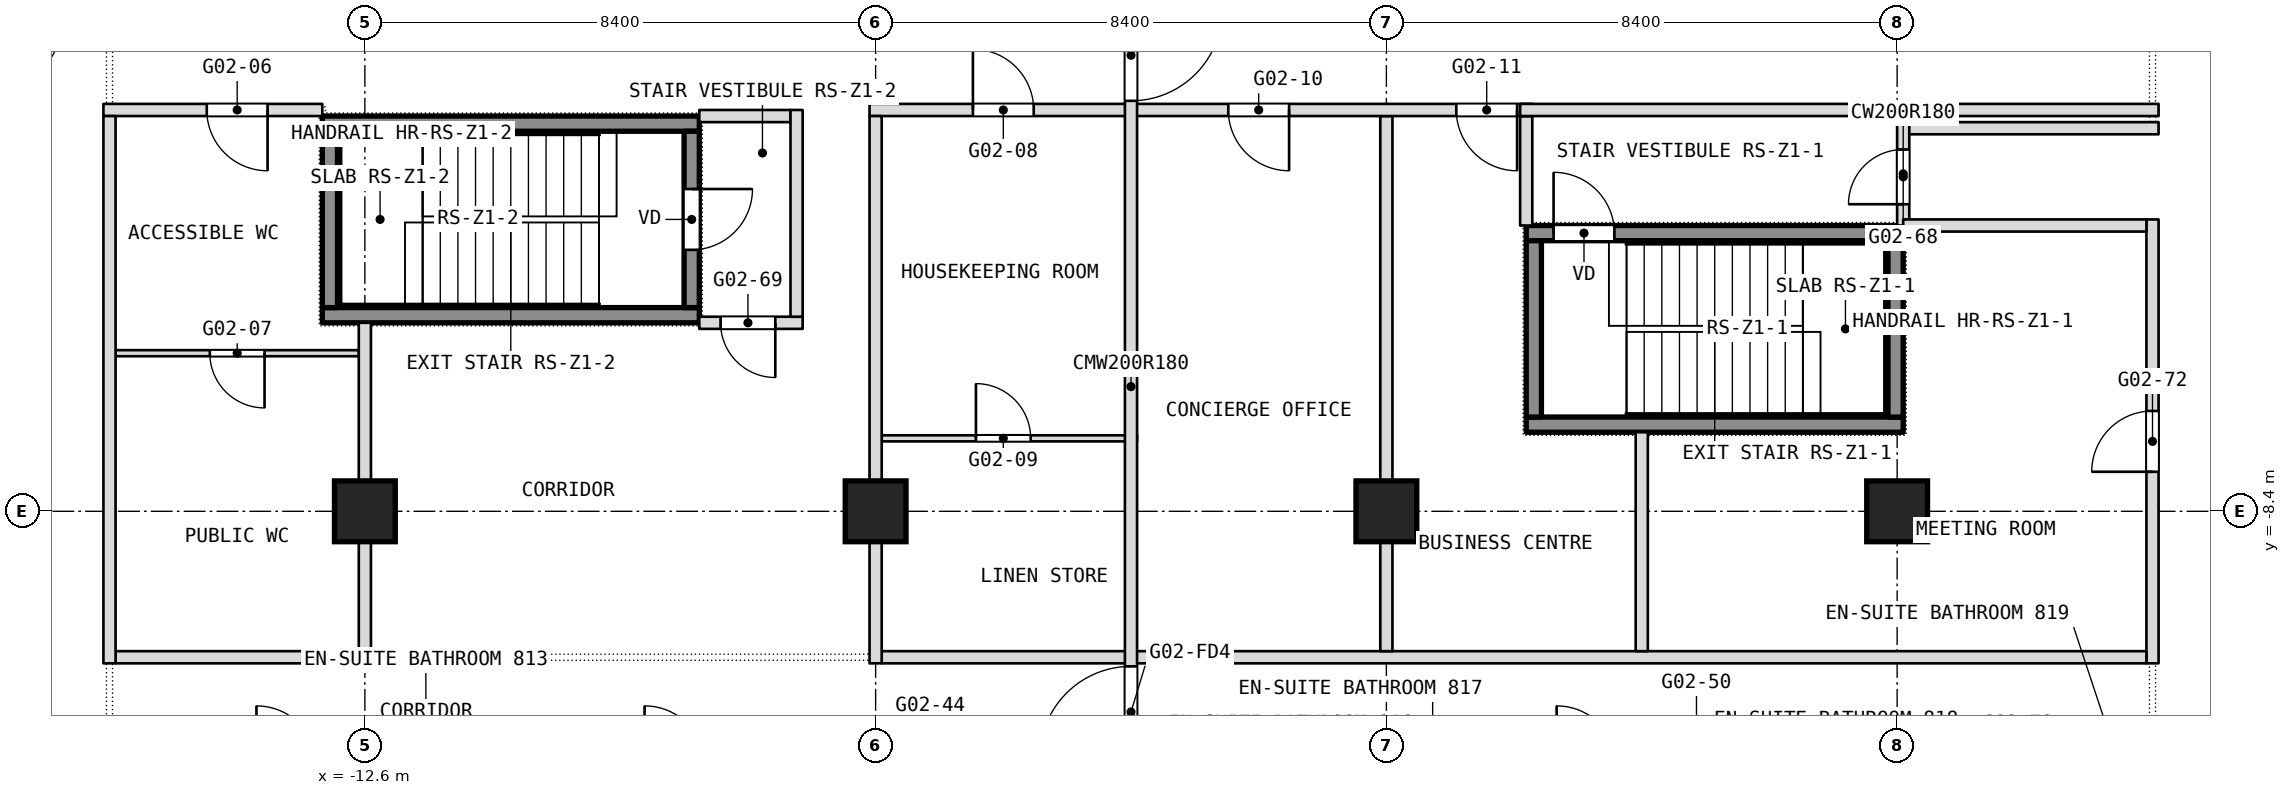
"""IFC4 building model, lengths in metres.
Left out: names, types, materials, properties, quantities, classifications, styles, units other than length and angle.
Written with IfcOpenShell. Run it as: python <this file> out.ifc"""

import sys

from ifc_helpers import new_model, si_unit, direction, frame, frame_2d, origin, origin_2d, place, context, subcontext, project, spatial, rectangle, extrude, element, fill, save


model = new_model("IFC4")
c1 = context("Model", 3, precision=1e-05, world=origin(), true_north=direction((0.0, 1.0)))
c2 = subcontext(c1, "Body", "Model", "MODEL_VIEW")
j1 = project(units=[si_unit("LENGTHUNIT", "METRE"), si_unit("PLANEANGLEUNIT", "RADIAN")], contexts=[c1])
p1 = place(None, origin())
s1 = spatial("IfcSite", under=j1, at=p1, CompositionType="ELEMENT")
p2 = place(p1, origin())
s2 = spatial("IfcBuilding", under=s1, at=p2, CompositionType="ELEMENT")
p3 = place(p2, frame((0.0, 0.0, 43.7)))
s3 = spatial("IfcBuildingStorey", under=s2, at=p3, CompositionType="ELEMENT", Elevation=43.7)
for number, where, z_axis, x_axis in (
    (1, (-12.6, -8.4, 0.0), (0.0, 0.0, 1.0), (1.0, 0.0, 0.0)),
    (2, (-4.2, -8.4, 0.0), (0.0, 0.0, 1.0), (1.0, 0.0, 0.0)),
    (3, (4.2, -8.4, 0.0), (0.0, 0.0, 1.0), (1.0, 0.0, 0.0)),
    (4, (12.6, -8.4, 0.0), (0.0, 0.0, 1.0), (1.0, 0.0, 0.0)),
):
    element("IfcColumn", number, at=place(p3, frame(where, z_axis=z_axis, x_axis=x_axis)), inside=s3, PredefinedType="COLUMN", context=c2, shape_type="SweptSolid", body=[
        extrude(rectangle(XDim=1.0, YDim=1.0, at=origin_2d()), origin(), (0.0, 0.0, 1.0), 3.6),
    ])
p4 = place(p3, frame((16.8, -10.9, 0.0), z_axis=(0.0, 0.0, 1.0), x_axis=(0.0, 1.0, 0.0)))
e5 = element("IfcWall", 5, at=p4, inside=s3, PredefinedType="PARTITIONING", context=c2, shape_type="SweptSolid", body=[
    extrude(rectangle(XDim=7.3, YDim=0.2, at=frame_2d((3.65, 0.0))), origin(), (0.0, 0.0, 1.0), 3.34),
])
p5 = place(p4, frame((3.15, 0.0, 0.0)))
e6 = element("IfcOpeningElement", 6, at=p5, cuts=e5, PredefinedType="OPENING", context=c2, shape_type="SweptSolid", body=[
    extrude(rectangle(XDim=1.0, YDim=2.1, at=frame_2d((0.5, 1.05))), frame((0.0, 0.1, 0.0), z_axis=(0.0, -1.0, 0.0), x_axis=(1.0, 0.0, 0.0)), (0.0, 0.0, 1.0), 0.2),
])
p6 = place(p3, frame((12.7, -3.7, 0.0), z_axis=(0.0, 0.0, 1.0), x_axis=(0.0, 1.0, 0.0)))
e7 = element("IfcWall", 7, at=p6, inside=s3, PredefinedType="PARTITIONING", context=c2, shape_type="SweptSolid", body=[
    extrude(rectangle(XDim=1.7, YDim=0.2, at=frame_2d((0.85, 0.0))), origin(), (0.0, 0.0, 1.0), 3.34),
])
p7 = place(p6, frame((0.35, 0.0, 0.0)))
e8 = element("IfcOpeningElement", 8, at=p7, cuts=e7, PredefinedType="OPENING", context=c2, shape_type="SweptSolid", body=[
    extrude(rectangle(XDim=0.9, YDim=2.1, at=frame_2d((0.45, 1.05))), frame((0.0, 0.1, 0.0), z_axis=(0.0, -1.0, 0.0), x_axis=(1.0, 0.0, 0.0)), (0.0, 0.0, 1.0), 0.2),
])
p8 = place(p3, frame((-16.7, -10.8, 0.0), z_axis=(0.0, 0.0, 1.0), x_axis=(1.0, 0.0, 0.0)))
e9 = element("IfcWall", 9, at=p8, inside=s3, PredefinedType="PARTITIONING", context=c2, shape_type="SweptSolid", body=[
    extrude(rectangle(XDim=4.0, YDim=0.2, at=frame_2d((2.0, 0.0))), origin(), (0.0, 0.0, 1.0), 3.34),
])
p9 = place(p3, frame((-4.1, -10.8, 0.0), z_axis=(0.0, 0.0, 1.0), x_axis=(1.0, 0.0, 0.0)))
e10 = element("IfcWall", 10, at=p9, inside=s3, PredefinedType="PARTITIONING", context=c2, shape_type="SweptSolid", body=[
    extrude(rectangle(XDim=20.8, YDim=0.2, at=frame_2d((10.4, 0.0))), origin(), (0.0, 0.0, 1.0), 3.34),
])
p10 = place(p3, frame((8.4, -10.7, 0.0), z_axis=(0.0, 0.0, 1.0), x_axis=(0.0, 1.0, 0.0)))
e11 = element("IfcWall", 11, at=p10, inside=s3, PredefinedType="PARTITIONING", context=c2, shape_type="SweptSolid", body=[
    extrude(rectangle(XDim=3.6, YDim=0.2, at=frame_2d((1.8, 0.0))), origin(), (0.0, 0.0, 1.0), 3.34),
])
p11 = place(p3, frame((-4.1, -7.2, 0.0), z_axis=(0.0, 0.0, 1.0), x_axis=(1.0, 0.0, 0.0)))
e12 = element("IfcWall", 12, at=p11, inside=s3, PredefinedType="PARTITIONING", context=c2, shape_type="SweptSolid", body=[
    extrude(rectangle(XDim=4.2, YDim=0.1, at=frame_2d((2.1, 0.0))), origin(), (0.0, 0.0, 1.0), 3.34),
])
p12 = place(p11, frame((1.55, 0.0, 0.0)))
e13 = element("IfcOpeningElement", 13, at=p12, cuts=e12, PredefinedType="OPENING", context=c2, shape_type="SweptSolid", body=[
    extrude(rectangle(XDim=0.9, YDim=2.1, at=frame_2d((0.45, 1.05))), frame((0.0, 0.05, 0.0), z_axis=(0.0, -1.0, 0.0), x_axis=(1.0, 0.0, 0.0)), (0.0, 0.0, 1.0), 0.1),
])
p13 = place(p3, frame((6.5, -3.7, 0.0), z_axis=(0.0, 0.0, 1.0), x_axis=(0.0, 1.0, 0.0)))
e14 = element("IfcWall", 14, at=p13, inside=s3, PredefinedType="PARTITIONING", context=c2, shape_type="SweptSolid", body=[
    extrude(rectangle(XDim=1.8, YDim=0.2, at=frame_2d((0.9, 0.0))), origin(), (0.0, 0.0, 1.0), 3.34),
])
p14 = place(p3, frame((-16.7, -5.8, 0.0), z_axis=(0.0, 0.0, 1.0), x_axis=(1.0, 0.0, 0.0)))
e15 = element("IfcWall", 15, at=p14, inside=s3, PredefinedType="PARTITIONING", context=c2, shape_type="SweptSolid", body=[
    extrude(rectangle(XDim=4.0, YDim=0.1, at=frame_2d((2.0, 0.0))), origin(), (0.0, 0.0, 1.0), 3.34),
])
p15 = place(p14, frame((1.55, 0.0, 0.0)))
e16 = element("IfcOpeningElement", 16, at=p15, cuts=e15, PredefinedType="OPENING", context=c2, shape_type="SweptSolid", body=[
    extrude(rectangle(XDim=0.9, YDim=2.1, at=frame_2d((0.45, 1.05))), frame((0.0, 0.05, 0.0), z_axis=(0.0, -1.0, 0.0), x_axis=(1.0, 0.0, 0.0)), (0.0, 0.0, 1.0), 0.1),
])
p16 = place(p3, frame((-7.1, -5.3, 0.0), z_axis=(0.0, 0.0, 1.0), x_axis=(1.0, 0.0, 0.0)))
e17 = element("IfcWall", 17, at=p16, inside=s3, PredefinedType="PARTITIONING", context=c2, shape_type="SweptSolid", body=[
    extrude(rectangle(XDim=1.7, YDim=0.2, at=frame_2d((0.85, 0.0))), origin(), (0.0, 0.0, 1.0), 3.34),
])
p17 = place(p16, frame((0.35, 0.0, 0.0)))
e18 = element("IfcOpeningElement", 18, at=p17, cuts=e17, PredefinedType="OPENING", context=c2, shape_type="SweptSolid", body=[
    extrude(rectangle(XDim=0.9, YDim=2.1, at=frame_2d((0.45, 1.05))), frame((0.0, 0.1, 0.0), z_axis=(0.0, -1.0, 0.0), x_axis=(1.0, 0.0, 0.0)), (0.0, 0.0, 1.0), 0.2),
])
p18 = place(p3, frame((4.2, -10.7, 0.0), z_axis=(0.0, 0.0, 1.0), x_axis=(0.0, 1.0, 0.0)))
e19 = element("IfcWall", 19, at=p18, inside=s3, PredefinedType="PARTITIONING", context=c2, shape_type="SweptSolid", body=[
    extrude(rectangle(XDim=8.8, YDim=0.2, at=frame_2d((4.4, 0.0))), origin(), (0.0, 0.0, 1.0), 3.34),
])
p19 = place(p3, frame((12.7, -3.7, 0.0), z_axis=(0.0, 0.0, 1.0), x_axis=(1.0, 0.0, 0.0)))
e20 = element("IfcWall", 20, at=p19, inside=s3, PredefinedType="PARTITIONING", context=c2, shape_type="SweptSolid", body=[
    extrude(rectangle(XDim=4.0, YDim=0.2, at=frame_2d((2.0, 0.0))), origin(), (0.0, 0.0, 1.0), 3.34),
])
p20 = place(p3, frame((12.8, -2.1, 0.0), z_axis=(0.0, 0.0, 1.0), x_axis=(1.0, 0.0, 0.0)))
e21 = element("IfcWall", 21, at=p20, inside=s3, PredefinedType="PARTITIONING", context=c2, shape_type="SweptSolid", body=[
    extrude(rectangle(XDim=4.1, YDim=0.2, at=frame_2d((2.05, 0.0))), origin(), (0.0, 0.0, 1.0), 3.34),
])
p21 = place(p3, frame((-7.1, -1.9, 0.0), z_axis=(0.0, 0.0, 1.0), x_axis=(1.0, 0.0, 0.0)))
e22 = element("IfcWall", 22, at=p21, inside=s3, PredefinedType="PARTITIONING", context=c2, shape_type="SweptSolid", body=[
    extrude(rectangle(XDim=1.5, YDim=0.2, at=frame_2d((0.75, 0.0))), origin(), (0.0, 0.0, 1.0), 3.34),
])
p22 = place(p3, frame((-16.9, -1.8, 0.0), z_axis=(0.0, 0.0, 1.0), x_axis=(1.0, 0.0, 0.0)))
e23 = element("IfcWall", 23, at=p22, inside=s3, PredefinedType="PARTITIONING", context=c2, shape_type="SweptSolid", body=[
    extrude(rectangle(XDim=3.6, YDim=0.2, at=frame_2d((1.8, 0.0))), origin(), (0.0, 0.0, 1.0), 3.34),
])
p23 = place(p22, frame((1.7, 0.0, 0.0)))
e24 = element("IfcOpeningElement", 24, at=p23, cuts=e23, PredefinedType="OPENING", context=c2, shape_type="SweptSolid", body=[
    extrude(rectangle(XDim=1.0, YDim=2.1, at=frame_2d((0.5, 1.05))), frame((0.0, 0.1, 0.0), z_axis=(0.0, -1.0, 0.0), x_axis=(1.0, 0.0, 0.0)), (0.0, 0.0, 1.0), 0.2),
])
p24 = place(p3, frame((-4.3, -1.8, 0.0), z_axis=(0.0, 0.0, 1.0), x_axis=(1.0, 0.0, 0.0)))
e25 = element("IfcWall", 25, at=p24, inside=s3, PredefinedType="PARTITIONING", context=c2, shape_type="SweptSolid", body=[
    extrude(rectangle(XDim=10.9, YDim=0.2, at=frame_2d((5.45, 0.0))), origin(), (0.0, 0.0, 1.0), 3.34),
])
p25 = place(p24, frame((1.7, 0.0, 0.0)))
e26 = element("IfcOpeningElement", 26, at=p25, cuts=e25, PredefinedType="OPENING", context=c2, shape_type="SweptSolid", body=[
    extrude(rectangle(XDim=1.0, YDim=2.1, at=frame_2d((0.5, 1.05))), frame((0.0, 0.1, 0.0), z_axis=(0.0, -1.0, 0.0), x_axis=(1.0, 0.0, 0.0)), (0.0, 0.0, 1.0), 0.2),
])
p26 = place(p24, frame((5.9, 0.0, 0.0)))
e27 = element("IfcOpeningElement", 27, at=p26, cuts=e25, PredefinedType="OPENING", context=c2, shape_type="SweptSolid", body=[
    extrude(rectangle(XDim=1.0, YDim=2.1, at=frame_2d((0.5, 1.05))), frame((0.0, 0.1, 0.0), z_axis=(0.0, -1.0, 0.0), x_axis=(1.0, 0.0, 0.0)), (0.0, 0.0, 1.0), 0.2),
])
p27 = place(p24, frame((9.65, 0.0, 0.0)))
e28 = element("IfcOpeningElement", 28, at=p27, cuts=e25, PredefinedType="OPENING", context=c2, shape_type="SweptSolid", body=[
    extrude(rectangle(XDim=1.0, YDim=2.1, at=frame_2d((0.5, 1.05))), frame((0.0, 0.1, 0.0), z_axis=(0.0, -1.0, 0.0), x_axis=(1.0, 0.0, 0.0)), (0.0, 0.0, 1.0), 0.2),
])
p28 = place(p3, frame((6.4, -1.8, 0.0), z_axis=(0.0, 0.0, 1.0), x_axis=(1.0, 0.0, 0.0)))
e29 = element("IfcWall", 29, at=p28, inside=s3, PredefinedType="PARTITIONING", context=c2, shape_type="SweptSolid", body=[
    extrude(rectangle(XDim=10.5, YDim=0.2, at=frame_2d((5.25, 0.0))), origin(), (0.0, 0.0, 1.0), 3.34),
])
p29 = place(p3, frame((0.0, -12.7, 0.0), z_axis=(0.0, 0.0, 1.0), x_axis=(0.0, 1.0, 0.0)))
e30 = element("IfcWall", 30, at=p29, inside=s3, PredefinedType="PARTITIONING", context=c2, shape_type="SweptSolid", body=[
    extrude(rectangle(XDim=12.7, YDim=0.2, at=frame_2d((6.35, 0.0))), origin(), (0.0, 0.0, 1.0), 3.34),
])
p30 = place(p29, frame((11.05, 0.0, 0.0)))
e31 = element("IfcOpeningElement", 31, at=p30, cuts=e30, PredefinedType="OPENING", context=c2, shape_type="SweptSolid", body=[
    extrude(rectangle(XDim=1.5, YDim=2.1, at=frame_2d((0.75, 1.05))), frame((0.0, 0.1, 0.0), z_axis=(0.0, -1.0, 0.0), x_axis=(1.0, 0.0, 0.0)), (0.0, 0.0, 1.0), 0.2),
])
p31 = place(p29, frame((0.25, 0.0, 0.0)))
e32 = element("IfcOpeningElement", 32, at=p31, cuts=e30, PredefinedType="OPENING", context=c2, shape_type="SweptSolid", body=[
    extrude(rectangle(XDim=1.5, YDim=2.1, at=frame_2d((0.75, 1.05))), frame((0.0, 0.1, 0.0), z_axis=(0.0, -1.0, 0.0), x_axis=(1.0, 0.0, 0.0)), (0.0, 0.0, 1.0), 0.2),
])
p32 = place(p3, frame((-4.2, -10.9, 0.0), z_axis=(0.0, 0.0, 1.0), x_axis=(0.0, 1.0, 0.0)))
e33 = element("IfcWall", 33, at=p32, inside=s3, PredefinedType="PARTITIONING", context=c2, shape_type="SweptSolid", body=[
    extrude(rectangle(XDim=9.0, YDim=0.2, at=frame_2d((4.5, 0.0))), origin(), (0.0, 0.0, 1.0), 3.34),
])
p33 = place(p3, frame((-5.5, -5.2, 0.0), z_axis=(0.0, 0.0, 1.0), x_axis=(0.0, 1.0, 0.0)))
e34 = element("IfcWall", 34, at=p33, inside=s3, PredefinedType="PARTITIONING", context=c2, shape_type="SweptSolid", body=[
    extrude(rectangle(XDim=3.4, YDim=0.2, at=frame_2d((1.7, 0.0))), origin(), (0.0, 0.0, 1.0), 3.34),
])
p34 = place(p3, frame((-12.6, -10.9, 0.0), z_axis=(0.0, 0.0, 1.0), x_axis=(0.0, 1.0, 0.0)))
e35 = element("IfcWall", 35, at=p34, inside=s3, PredefinedType="PARTITIONING", context=c2, shape_type="SweptSolid", body=[
    extrude(rectangle(XDim=5.6, YDim=0.2, at=frame_2d((2.8, 0.0))), origin(), (0.0, 0.0, 1.0), 3.34),
])
p35 = place(p3, frame((-16.8, -10.9, 0.0), z_axis=(0.0, 0.0, 1.0), x_axis=(0.0, 1.0, 0.0)))
e36 = element("IfcWall", 36, at=p35, inside=s3, PredefinedType="PARTITIONING", context=c2, shape_type="SweptSolid", body=[
    extrude(rectangle(XDim=9.0, YDim=0.2, at=frame_2d((4.5, 0.0))), origin(), (0.0, 0.0, 1.0), 3.34),
])
p36 = place(p3, frame((6.5, -6.975, 0.1), z_axis=(0.0, 0.0, 1.0), x_axis=(1.0, 0.0, 0.0)))
e37 = element("IfcWall", 37, at=p36, inside=s3, PredefinedType="SHEAR", context=c2, shape_type="SweptSolid", body=[
    extrude(rectangle(XDim=6.2, YDim=0.25, at=frame_2d((3.1, 0.0))), origin(), (0.0, 0.0, 1.0), 3.6),
])
p37 = place(p3, frame((6.5, -3.825, 0.1), z_axis=(0.0, 0.0, 1.0), x_axis=(1.0, 0.0, 0.0)))
e38 = element("IfcWall", 38, at=p37, inside=s3, PredefinedType="SHEAR", context=c2, shape_type="SweptSolid", body=[
    extrude(rectangle(XDim=6.2, YDim=0.25, at=frame_2d((3.1, 0.0))), origin(), (0.0, 0.0, 1.0), 3.6),
])
p38 = place(p37, frame((0.45, 0.0, 0.0)))
e39 = element("IfcOpeningElement", 39, at=p38, cuts=e38, PredefinedType="OPENING", context=c2, shape_type="SweptSolid", body=[
    extrude(rectangle(XDim=1.0, YDim=2.1, at=frame_2d((0.5, 1.05))), frame((0.0, 0.125, 0.0), z_axis=(0.0, -1.0, 0.0), x_axis=(1.0, 0.0, 0.0)), (0.0, 0.0, 1.0), 0.25),
])
for number, where, z_axis, x_axis in (
    (40, (6.625, -6.85, 0.1), (0.0, 0.0, 1.0), (0.0, 1.0, 0.0)),
    (41, (12.575, -6.85, 0.1), (0.0, 0.0, 1.0), (0.0, 1.0, 0.0)),
):
    element("IfcWall", number, at=place(p3, frame(where, z_axis=z_axis, x_axis=x_axis)), inside=s3, PredefinedType="SHEAR", context=c2, shape_type="SweptSolid", body=[
        extrude(rectangle(XDim=2.9, YDim=0.25, at=frame_2d((1.45, 0.0))), origin(), (0.0, 0.0, 1.0), 3.6),
    ])
for number, where, z_axis, x_axis in (
    (42, (-13.3, -5.175, 0.1), (0.0, 0.0, 1.0), (1.0, 0.0, 0.0)),
    (43, (-13.3, -2.025, 0.1), (0.0, 0.0, 1.0), (1.0, 0.0, 0.0)),
):
    element("IfcWall", number, at=place(p3, frame(where, z_axis=z_axis, x_axis=x_axis)), inside=s3, PredefinedType="SHEAR", context=c2, shape_type="SweptSolid", body=[
        extrude(rectangle(XDim=6.2, YDim=0.25, at=frame_2d((3.1, 0.0))), origin(), (0.0, 0.0, 1.0), 3.6),
    ])
p39 = place(p3, frame((-13.175, -5.05, 0.1), z_axis=(0.0, 0.0, 1.0), x_axis=(0.0, 1.0, 0.0)))
e44 = element("IfcWall", 44, at=p39, inside=s3, PredefinedType="SHEAR", context=c2, shape_type="SweptSolid", body=[
    extrude(rectangle(XDim=2.9, YDim=0.25, at=frame_2d((1.45, 0.0))), origin(), (0.0, 0.0, 1.0), 3.6),
])
p40 = place(p3, frame((-7.225, -5.05, 0.1), z_axis=(0.0, 0.0, 1.0), x_axis=(0.0, 1.0, 0.0)))
e45 = element("IfcWall", 45, at=p40, inside=s3, PredefinedType="SHEAR", context=c2, shape_type="SweptSolid", body=[
    extrude(rectangle(XDim=2.9, YDim=0.25, at=frame_2d((1.45, 0.0))), origin(), (0.0, 0.0, 1.0), 3.6),
])
p41 = place(p40, frame((0.95, 0.0, 0.0)))
e46 = element("IfcOpeningElement", 46, at=p41, cuts=e45, PredefinedType="OPENING", context=c2, shape_type="SweptSolid", body=[
    extrude(rectangle(XDim=1.0, YDim=2.1, at=frame_2d((0.5, 1.05))), frame((0.0, 0.125, 0.0), z_axis=(0.0, -1.0, 0.0), x_axis=(1.0, 0.0, 0.0)), (0.0, 0.0, 1.0), 0.25),
])
p42 = place(p5, origin())
e47 = element("IfcDoor", 47, at=p42, inside=s3, OperationType="SINGLE_SWING_RIGHT", PredefinedType="DOOR", context=c2, shape_type="SweptSolid", body=[
    extrude(rectangle(XDim=1.0, YDim=2.1, at=frame_2d((0.5, 1.05))), frame((0.0, 0.025, 0.0), z_axis=(0.0, -1.0, 0.0), x_axis=(1.0, 0.0, 0.0)), (0.0, 0.0, 1.0), 0.05),
])
fill(e6, e47)
p43 = place(p7, origin())
e48 = element("IfcDoor", 48, at=p43, inside=s3, OperationType="SINGLE_SWING_LEFT", PredefinedType="DOOR", context=c2, shape_type="SweptSolid", body=[
    extrude(rectangle(XDim=0.9, YDim=2.1, at=frame_2d((0.45, 1.05))), frame((0.0, 0.025, 0.0), z_axis=(0.0, -1.0, 0.0), x_axis=(1.0, 0.0, 0.0)), (0.0, 0.0, 1.0), 0.05),
])
fill(e8, e48)
p44 = place(p12, origin())
e49 = element("IfcDoor", 49, at=p44, inside=s3, OperationType="SINGLE_SWING_RIGHT", PredefinedType="DOOR", context=c2, shape_type="SweptSolid", body=[
    extrude(rectangle(XDim=0.9, YDim=2.1, at=frame_2d((0.45, 1.05))), frame((0.0, 0.025, 0.0), z_axis=(0.0, -1.0, 0.0), x_axis=(1.0, 0.0, 0.0)), (0.0, 0.0, 1.0), 0.05),
])
fill(e13, e49)
p45 = place(p15, origin())
e50 = element("IfcDoor", 50, at=p45, inside=s3, OperationType="SINGLE_SWING_LEFT", PredefinedType="DOOR", context=c2, shape_type="SweptSolid", body=[
    extrude(rectangle(XDim=0.9, YDim=2.1, at=frame_2d((0.45, 1.05))), frame((0.0, 0.025, 0.0), z_axis=(0.0, -1.0, 0.0), x_axis=(1.0, 0.0, 0.0)), (0.0, 0.0, 1.0), 0.05),
])
fill(e16, e50)
p46 = place(p17, origin())
e51 = element("IfcDoor", 51, at=p46, inside=s3, OperationType="SINGLE_SWING_RIGHT", PredefinedType="DOOR", context=c2, shape_type="SweptSolid", body=[
    extrude(rectangle(XDim=0.9, YDim=2.1, at=frame_2d((0.45, 1.05))), frame((0.0, 0.025, 0.0), z_axis=(0.0, -1.0, 0.0), x_axis=(1.0, 0.0, 0.0)), (0.0, 0.0, 1.0), 0.05),
])
fill(e18, e51)
p47 = place(p23, origin())
e52 = element("IfcDoor", 52, at=p47, inside=s3, OperationType="SINGLE_SWING_RIGHT", PredefinedType="DOOR", context=c2, shape_type="SweptSolid", body=[
    extrude(rectangle(XDim=1.0, YDim=2.1, at=frame_2d((0.5, 1.05))), frame((0.0, 0.025, 0.0), z_axis=(0.0, -1.0, 0.0), x_axis=(1.0, 0.0, 0.0)), (0.0, 0.0, 1.0), 0.05),
])
fill(e24, e52)
p48 = place(p25, origin())
e53 = element("IfcDoor", 53, at=p48, inside=s3, OperationType="SINGLE_SWING_RIGHT", PredefinedType="DOOR", context=c2, shape_type="SweptSolid", body=[
    extrude(rectangle(XDim=1.0, YDim=2.1, at=frame_2d((0.5, 1.05))), frame((0.0, 0.025, 0.0), z_axis=(0.0, -1.0, 0.0), x_axis=(1.0, 0.0, 0.0)), (0.0, 0.0, 1.0), 0.05),
])
fill(e26, e53)
p49 = place(p26, origin())
e54 = element("IfcDoor", 54, at=p49, inside=s3, OperationType="SINGLE_SWING_RIGHT", PredefinedType="DOOR", context=c2, shape_type="SweptSolid", body=[
    extrude(rectangle(XDim=1.0, YDim=2.1, at=frame_2d((0.5, 1.05))), frame((0.0, 0.025, 0.0), z_axis=(0.0, -1.0, 0.0), x_axis=(1.0, 0.0, 0.0)), (0.0, 0.0, 1.0), 0.05),
])
fill(e27, e54)
p50 = place(p27, origin())
e55 = element("IfcDoor", 55, at=p50, inside=s3, OperationType="SINGLE_SWING_LEFT", PredefinedType="DOOR", context=c2, shape_type="SweptSolid", body=[
    extrude(rectangle(XDim=1.0, YDim=2.1, at=frame_2d((0.5, 1.05))), frame((0.0, 0.025, 0.0), z_axis=(0.0, -1.0, 0.0), x_axis=(1.0, 0.0, 0.0)), (0.0, 0.0, 1.0), 0.05),
])
fill(e28, e55)
p51 = place(p38, origin())
e56 = element("IfcDoor", 56, at=p51, inside=s3, OperationType="SINGLE_SWING_LEFT", PredefinedType="DOOR", context=c2, shape_type="SweptSolid", body=[
    extrude(rectangle(XDim=1.0, YDim=2.1, at=frame_2d((0.5, 1.05))), frame((0.0, 0.025, 0.0), z_axis=(0.0, -1.0, 0.0), x_axis=(1.0, 0.0, 0.0)), (0.0, 0.0, 1.0), 0.05),
])
fill(e39, e56)
p52 = place(p41, origin())
e57 = element("IfcDoor", 57, at=p52, inside=s3, OperationType="SINGLE_SWING_LEFT", PredefinedType="DOOR", context=c2, shape_type="SweptSolid", body=[
    extrude(rectangle(XDim=1.0, YDim=2.1, at=frame_2d((0.5, 1.05))), frame((0.0, 0.025, 0.0), z_axis=(0.0, -1.0, 0.0), x_axis=(1.0, 0.0, 0.0)), (0.0, 0.0, 1.0), 0.05),
])
fill(e46, e57)
p53 = place(p30, origin())
e58 = element("IfcDoor", 58, at=p53, inside=s3, OperationType="DOUBLE_DOOR_DOUBLE_SWING", PredefinedType="DOOR", context=c2, shape_type="SweptSolid", body=[
    extrude(rectangle(XDim=1.5, YDim=2.1, at=frame_2d((0.75, 1.05))), frame((0.0, 0.025, 0.0), z_axis=(0.0, -1.0, 0.0), x_axis=(1.0, 0.0, 0.0)), (0.0, 0.0, 1.0), 0.05),
])
fill(e31, e58)
p54 = place(p31, origin())
e59 = element("IfcDoor", 59, at=p54, inside=s3, OperationType="DOUBLE_DOOR_DOUBLE_SWING", PredefinedType="DOOR", context=c2, shape_type="SweptSolid", body=[
    extrude(rectangle(XDim=1.5, YDim=2.1, at=frame_2d((0.75, 1.05))), frame((0.0, 0.025, 0.0), z_axis=(0.0, -1.0, 0.0), x_axis=(1.0, 0.0, 0.0)), (0.0, 0.0, 1.0), 0.05),
])
fill(e32, e59)
save(model, sys.argv[1])
